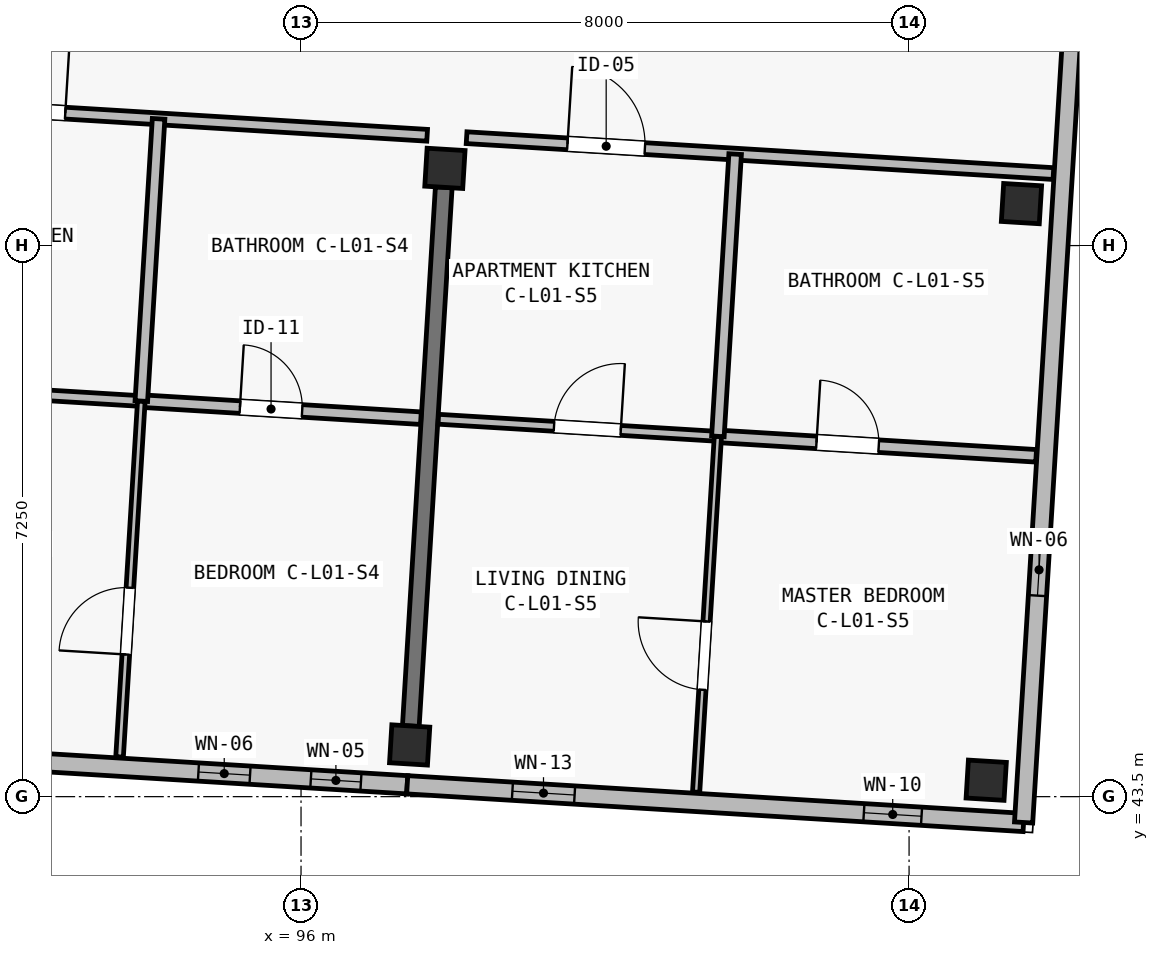
"""IFC4 building model, lengths in metres.
Left out: names, types, materials, properties, quantities, classifications, styles, units other than length and angle.
Written with IfcOpenShell. Run it as: python <this file> out.ifc"""

import sys

from ifc_helpers import new_model, si_unit, direction, frame, frame_2d, origin, origin_2d, place, context, subcontext, project, spatial, rectangle, extrude, element, fill, save


model = new_model("IFC4")
c1 = context("Model", 3, precision=1e-05, world=origin(), true_north=direction((0.0, 1.0)))
c2 = subcontext(c1, "Body", "Model", "MODEL_VIEW")
j1 = project(units=[si_unit("LENGTHUNIT", "METRE"), si_unit("PLANEANGLEUNIT", "RADIAN")], contexts=[c1])
p1 = place(None, origin())
s1 = spatial("IfcSite", under=j1, at=p1, CompositionType="ELEMENT")
p2 = place(p1, origin())
s2 = spatial("IfcBuilding", under=s1, at=p2, CompositionType="ELEMENT")
p3 = place(p2, frame((0.0, 0.0, 4.5)))
s3 = spatial("IfcBuildingStorey", under=s2, at=p3, CompositionType="ELEMENT", Elevation=4.5)
for number, where, z_axis, x_axis in (
    (1, (97.429, 44.18, 0.0), (0.0, 0.0, 1.0), (0.998, -0.061, 0.0)),
    (2, (97.893, 51.766, 0.0), (0.0, 0.0, 1.0), (0.998, -0.061, 0.0)),
    (3, (105.015, 43.716, 0.0), (0.0, 0.0, 1.0), (0.998, -0.061, 0.0)),
    (4, (105.479, 51.302, 0.0), (0.0, 0.0, 1.0), (0.998, -0.061, 0.0)),
):
    element("IfcColumn", number, at=place(p3, frame(where, z_axis=z_axis, x_axis=x_axis)), inside=s3, PredefinedType="COLUMN", context=c2, shape_type="SweptSolid", body=[
        extrude(rectangle(XDim=0.5, YDim=0.5, at=origin_2d()), origin(), (0.0, 0.0, 1.0), 3.9),
    ])
p4 = place(p3, frame((97.444, 44.43, -0.25), z_axis=(0.0, 0.0, 1.0), x_axis=(0.061070212127, 0.998133472633, 0.0)))
e5 = element("IfcWall", 5, at=p4, inside=s3, PredefinedType="SHEAR", context=c2, shape_type="SweptSolid", body=[
    extrude(rectangle(XDim=7.1, YDim=0.22, at=frame_2d((3.55, 0.0))), origin(), (0.0, 0.0, 1.0), 3.4),
])
p5 = place(p3, frame((97.397, 43.656, 0.0), z_axis=(0.0, 0.0, 1.0), x_axis=(-0.998135549572, 0.061036257095, 0.0)))
e6 = element("IfcWall", 6, at=p5, inside=s3, PredefinedType="SOLIDWALL", context=c2, shape_type="SweptSolid", body=[
    extrude(rectangle(XDim=7.6, YDim=0.24, at=frame_2d((3.8, 0.0))), origin(), (0.0, 0.0, 1.0), 3.65),
])
p6 = place(p5, frame((0.61, 0.0, 0.52)))
e7 = element("IfcOpeningElement", 7, at=p6, cuts=e6, PredefinedType="OPENING", context=c2, shape_type="SweptSolid", body=[
    extrude(rectangle(XDim=0.66, YDim=2.32, at=frame_2d((0.33, 1.16))), frame((0.0, 0.135, 0.0), z_axis=(0.0, -1.0, 0.0), x_axis=(1.0, 0.0, 0.0)), (0.0, 0.0, 1.0), 0.27),
])
p7 = place(p5, frame((2.072, 0.0, 0.42)))
e8 = element("IfcOpeningElement", 8, at=p7, cuts=e6, PredefinedType="OPENING", context=c2, shape_type="SweptSolid", body=[
    extrude(rectangle(XDim=0.68, YDim=2.24, at=frame_2d((0.34, 1.12))), frame((0.0, 0.135, 0.0), z_axis=(0.0, -1.0, 0.0), x_axis=(1.0, 0.0, 0.0)), (0.0, 0.0, 1.0), 0.27),
])
p8 = place(p5, frame((5.066, 0.0, 0.52)))
e9 = element("IfcOpeningElement", 9, at=p8, cuts=e6, PredefinedType="OPENING", context=c2, shape_type="SweptSolid", body=[
    extrude(rectangle(XDim=0.72, YDim=2.16, at=frame_2d((0.36, 1.08))), frame((0.0, 0.135, 0.0), z_axis=(0.0, -1.0, 0.0), x_axis=(1.0, 0.0, 0.0)), (0.0, 0.0, 1.0), 0.27),
])
p9 = place(p3, frame((105.507, 43.16, 0.0), z_axis=(0.0, 0.0, 1.0), x_axis=(-0.998134248939, 0.061057522844, 0.0)))
e10 = element("IfcWall", 10, at=p9, inside=s3, PredefinedType="SOLIDWALL", context=c2, shape_type="SweptSolid", body=[
    extrude(rectangle(XDim=8.125, YDim=0.24, at=frame_2d((4.062, 0.0))), origin(), (0.0, 0.0, 1.0), 3.65),
])
p10 = place(p9, frame((1.345, 0.0, 0.42)))
e11 = element("IfcOpeningElement", 11, at=p10, cuts=e10, PredefinedType="OPENING", context=c2, shape_type="SweptSolid", body=[
    extrude(rectangle(XDim=0.76, YDim=2.34, at=frame_2d((0.38, 1.17))), frame((0.0, 0.135, 0.0), z_axis=(0.0, -1.0, 0.0), x_axis=(1.0, 0.0, 0.0)), (0.0, 0.0, 1.0), 0.27),
])
p11 = place(p9, frame((5.919, 0.0, 0.42)))
e12 = element("IfcOpeningElement", 12, at=p11, cuts=e10, PredefinedType="OPENING", context=c2, shape_type="SweptSolid", body=[
    extrude(rectangle(XDim=0.82, YDim=2.18, at=frame_2d((0.41, 1.09))), frame((0.0, 0.135, 0.0), z_axis=(0.0, -1.0, 0.0), x_axis=(1.0, 0.0, 0.0)), (0.0, 0.0, 1.0), 0.27),
])
p12 = place(p3, frame((106.768, 63.771, 0.0), z_axis=(0.0, 0.0, 1.0), x_axis=(-0.061053332998, -0.99813450523, 0.0)))
e13 = element("IfcWall", 13, at=p12, inside=s3, PredefinedType="SOLIDWALL", context=c2, shape_type="SweptSolid", body=[
    extrude(rectangle(XDim=20.65, YDim=0.24, at=frame_2d((10.325, 0.0))), origin(), (0.0, 0.0, 1.0), 3.65),
])
p13 = place(p12, frame((2.63, 0.0, 0.52)))
e14 = element("IfcOpeningElement", 14, at=p13, cuts=e13, PredefinedType="OPENING", context=c2, shape_type="SweptSolid", body=[
    extrude(rectangle(XDim=0.84, YDim=2.28, at=frame_2d((0.42, 1.14))), frame((0.0, 0.135, 0.0), z_axis=(0.0, -1.0, 0.0), x_axis=(1.0, 0.0, 0.0)), (0.0, 0.0, 1.0), 0.27),
])
p14 = place(p12, frame((16.98, 0.0, 0.45)))
e15 = element("IfcOpeningElement", 15, at=p14, cuts=e13, PredefinedType="OPENING", context=c2, shape_type="SweptSolid", body=[
    extrude(rectangle(XDim=0.68, YDim=2.24, at=frame_2d((0.34, 1.12))), frame((0.0, 0.135, 0.0), z_axis=(0.0, -1.0, 0.0), x_axis=(1.0, 0.0, 0.0)), (0.0, 0.0, 1.0), 0.27),
])
p15 = place(p3, frame((90.593, 52.633, 0.0), z_axis=(0.0, 0.0, 1.0), x_axis=(0.998135538078, -0.061036445065, 0.0)))
e16 = element("IfcWall", 16, at=p15, inside=s3, PredefinedType="PARTITIONING", context=c2, shape_type="SweptSolid", body=[
    extrude(rectangle(XDim=7.08, YDim=0.155, at=frame_2d((3.54, 0.0))), origin(), (0.0, 0.0, 1.0), 3.62),
])
p16 = place(p15, frame((1.33, 0.0, 0.0)))
e17 = element("IfcOpeningElement", 17, at=p16, cuts=e16, PredefinedType="OPENING", context=c2, shape_type="SweptSolid", body=[
    extrude(rectangle(XDim=0.98, YDim=2.15, at=frame_2d((0.49, 1.075))), frame((0.0, 0.093, 0.0), z_axis=(0.0, -1.0, 0.0), x_axis=(1.0, 0.0, 0.0)), (0.0, 0.0, 1.0), 0.185),
])
p17 = place(p3, frame((90.221, 48.929, 0.0), z_axis=(0.0, 0.0, 1.0), x_axis=(0.99813243538, -0.061087162657, 0.0)))
e18 = element("IfcWall", 18, at=p17, inside=s3, PredefinedType="PARTITIONING", context=c2, shape_type="SweptSolid", body=[
    extrude(rectangle(XDim=3.685, YDim=0.14, at=frame_2d((1.842, 0.0))), origin(), (0.0, 0.0, 1.0), 3.62),
])
p18 = place(p17, frame((1.525, 0.0, 0.0)))
e19 = element("IfcOpeningElement", 19, at=p18, cuts=e18, PredefinedType="OPENING", context=c2, shape_type="SweptSolid", body=[
    extrude(rectangle(XDim=0.9, YDim=2.1, at=frame_2d((0.45, 1.05))), frame((0.0, 0.085, 0.0), z_axis=(0.0, -1.0, 0.0), x_axis=(1.0, 0.0, 0.0)), (0.0, 0.0, 1.0), 0.17),
])
p19 = place(p3, frame((93.899, 48.704, 0.0), z_axis=(0.0, 0.0, 1.0), x_axis=(0.998136719672, -0.061017119263, 0.0)))
e20 = element("IfcWall", 20, at=p19, inside=s3, PredefinedType="PLUMBINGWALL", context=c2, shape_type="SweptSolid", body=[
    extrude(rectangle(XDim=3.685, YDim=0.165, at=frame_2d((1.843, 0.0))), origin(), (0.0, 0.0, 1.0), 3.62),
])
p20 = place(p19, frame((1.3, 0.0, 0.0)))
e21 = element("IfcOpeningElement", 21, at=p20, cuts=e20, PredefinedType="OPENING", context=c2, shape_type="SweptSolid", body=[
    extrude(rectangle(XDim=0.82, YDim=2.08, at=frame_2d((0.41, 1.04))), frame((0.0, 0.097, 0.0), z_axis=(0.0, -1.0, 0.0), x_axis=(1.0, 0.0, 0.0)), (0.0, 0.0, 1.0), 0.195),
])
p21 = place(p3, frame((93.612, 44.023, 0.0), z_axis=(0.0, 0.0, 1.0), x_axis=(0.061062434628, 0.998133948465, 0.0)))
e22 = element("IfcWall", 22, at=p21, inside=s3, PredefinedType="PARTITIONING", context=c2, shape_type="SweptSolid", body=[
    extrude(rectangle(XDim=4.69, YDim=0.1, at=frame_2d((2.345, 0.0))), origin(), (0.0, 0.0, 1.0), 3.62),
])
p22 = place(p21, frame((1.35, 0.0, 0.0)))
e23 = element("IfcOpeningElement", 23, at=p22, cuts=e22, PredefinedType="OPENING", context=c2, shape_type="SweptSolid", body=[
    extrude(rectangle(XDim=0.88, YDim=2.1, at=frame_2d((0.44, 1.05))), frame((0.0, 0.065, 0.0), z_axis=(0.0, -1.0, 0.0), x_axis=(1.0, 0.0, 0.0)), (0.0, 0.0, 1.0), 0.13),
])
p23 = place(p3, frame((93.899, 48.704, 0.0), z_axis=(0.0, 0.0, 1.0), x_axis=(0.061034005467, 0.998135687257, 0.0)))
e24 = element("IfcWall", 24, at=p23, inside=s3, PredefinedType="PLUMBINGWALL", context=c2, shape_type="SweptSolid", body=[
    extrude(rectangle(XDim=3.72, YDim=0.165, at=frame_2d((1.86, 0.0))), origin(), (0.0, 0.0, 1.0), 3.62),
])
p24 = place(p3, frame((98.178, 52.169, 0.0), z_axis=(0.0, 0.0, 1.0), x_axis=(0.998133272394, -0.061073484761, 0.0)))
e25 = element("IfcWall", 25, at=p24, inside=s3, PredefinedType="PARTITIONING", context=c2, shape_type="SweptSolid", body=[
    extrude(rectangle(XDim=7.735, YDim=0.155, at=frame_2d((3.868, 0.0))), origin(), (0.0, 0.0, 1.0), 3.62),
])
p25 = place(p24, frame((1.33, 0.0, 0.0)))
e26 = element("IfcOpeningElement", 26, at=p25, cuts=e25, PredefinedType="OPENING", context=c2, shape_type="SweptSolid", body=[
    extrude(rectangle(XDim=1.02, YDim=2.2, at=frame_2d((0.51, 1.1))), frame((0.0, 0.093, 0.0), z_axis=(0.0, -1.0, 0.0), x_axis=(1.0, 0.0, 0.0)), (0.0, 0.0, 1.0), 0.185),
])
p26 = place(p3, frame((97.806, 48.465, 0.0), z_axis=(0.0, 0.0, 1.0), x_axis=(0.998136719672, -0.061017119263, 0.0)))
e27 = element("IfcWall", 27, at=p26, inside=s3, PredefinedType="PARTITIONING", context=c2, shape_type="SweptSolid", body=[
    extrude(rectangle(XDim=3.685, YDim=0.13, at=frame_2d((1.843, 0.0))), origin(), (0.0, 0.0, 1.0), 3.62),
])
p27 = place(p26, frame((1.525, 0.0, 0.0)))
e28 = element("IfcOpeningElement", 28, at=p27, cuts=e27, PredefinedType="OPENING", context=c2, shape_type="SweptSolid", body=[
    extrude(rectangle(XDim=0.88, YDim=2.1, at=frame_2d((0.44, 1.05))), frame((0.0, 0.08, 0.0), z_axis=(0.0, -1.0, 0.0), x_axis=(1.0, 0.0, 0.0)), (0.0, 0.0, 1.0), 0.16),
])
p28 = place(p3, frame((101.485, 48.24, 0.0), z_axis=(0.0, 0.0, 1.0), x_axis=(0.998134581856, -0.061052080255, 0.0)))
e29 = element("IfcWall", 29, at=p28, inside=s3, PredefinedType="PLUMBINGWALL", context=c2, shape_type="SweptSolid", body=[
    extrude(rectangle(XDim=4.195, YDim=0.165, at=frame_2d((2.097, 0.0))), origin(), (0.0, 0.0, 1.0), 3.62),
])
p29 = place(p28, frame((1.3, 0.0, 0.0)))
e30 = element("IfcOpeningElement", 30, at=p29, cuts=e29, PredefinedType="OPENING", context=c2, shape_type="SweptSolid", body=[
    extrude(rectangle(XDim=0.82, YDim=2.08, at=frame_2d((0.41, 1.04))), frame((0.0, 0.097, 0.0), z_axis=(0.0, -1.0, 0.0), x_axis=(1.0, 0.0, 0.0)), (0.0, 0.0, 1.0), 0.195),
])
p30 = place(p3, frame((101.198, 43.559, 0.0), z_axis=(0.0, 0.0, 1.0), x_axis=(0.061059262019, 0.998134142549, 0.0)))
e31 = element("IfcWall", 31, at=p30, inside=s3, PredefinedType="PARTITIONING", context=c2, shape_type="SweptSolid", body=[
    extrude(rectangle(XDim=4.69, YDim=0.095, at=frame_2d((2.345, 0.0))), origin(), (0.0, 0.0, 1.0), 3.62),
])
p31 = place(p30, frame((1.35, 0.0, 0.0)))
e32 = element("IfcOpeningElement", 32, at=p31, cuts=e31, PredefinedType="OPENING", context=c2, shape_type="SweptSolid", body=[
    extrude(rectangle(XDim=0.9, YDim=2.1, at=frame_2d((0.45, 1.05))), frame((0.0, 0.062, 0.0), z_axis=(0.0, -1.0, 0.0), x_axis=(1.0, 0.0, 0.0)), (0.0, 0.0, 1.0), 0.125),
])
p32 = place(p3, frame((101.485, 48.24, 0.0), z_axis=(0.0, 0.0, 1.0), x_axis=(0.061038003798, 0.998135442759, 0.0)))
e33 = element("IfcWall", 33, at=p32, inside=s3, PredefinedType="PLUMBINGWALL", context=c2, shape_type="SweptSolid", body=[
    extrude(rectangle(XDim=3.72, YDim=0.165, at=frame_2d((1.86, 0.0))), origin(), (0.0, 0.0, 1.0), 3.62),
])
p33 = place(p6, origin())
e34 = element("IfcWindow", 34, at=p33, inside=s3, PartitioningType="SINGLE_PANEL", PredefinedType="WINDOW", context=c2, shape_type="SweptSolid", body=[
    extrude(rectangle(XDim=0.66, YDim=2.32, at=frame_2d((0.33, 1.16))), frame((0.0, 0.03, 0.0), z_axis=(0.0, -1.0, 0.0), x_axis=(1.0, 0.0, 0.0)), (0.0, 0.0, 1.0), 0.06),
])
fill(e7, e34)
p34 = place(p7, origin())
e35 = element("IfcWindow", 35, at=p34, inside=s3, PartitioningType="SINGLE_PANEL", PredefinedType="WINDOW", context=c2, shape_type="SweptSolid", body=[
    extrude(rectangle(XDim=0.68, YDim=2.24, at=frame_2d((0.34, 1.12))), frame((0.0, 0.03, 0.0), z_axis=(0.0, -1.0, 0.0), x_axis=(1.0, 0.0, 0.0)), (0.0, 0.0, 1.0), 0.06),
])
fill(e8, e35)
p35 = place(p10, origin())
e36 = element("IfcWindow", 36, at=p35, inside=s3, PartitioningType="SINGLE_PANEL", PredefinedType="WINDOW", context=c2, shape_type="SweptSolid", body=[
    extrude(rectangle(XDim=0.76, YDim=2.34, at=frame_2d((0.38, 1.17))), frame((0.0, 0.03, 0.0), z_axis=(0.0, -1.0, 0.0), x_axis=(1.0, 0.0, 0.0)), (0.0, 0.0, 1.0), 0.06),
])
fill(e11, e36)
p36 = place(p11, origin())
e37 = element("IfcWindow", 37, at=p36, inside=s3, PartitioningType="SINGLE_PANEL", PredefinedType="WINDOW", context=c2, shape_type="SweptSolid", body=[
    extrude(rectangle(XDim=0.82, YDim=2.18, at=frame_2d((0.41, 1.09))), frame((0.0, 0.03, 0.0), z_axis=(0.0, -1.0, 0.0), x_axis=(1.0, 0.0, 0.0)), (0.0, 0.0, 1.0), 0.06),
])
fill(e12, e37)
p37 = place(p14, origin())
e38 = element("IfcWindow", 38, at=p37, inside=s3, PartitioningType="SINGLE_PANEL", PredefinedType="WINDOW", context=c2, shape_type="SweptSolid", body=[
    extrude(rectangle(XDim=0.68, YDim=2.24, at=frame_2d((0.34, 1.12))), frame((0.0, 0.03, 0.0), z_axis=(0.0, -1.0, 0.0), x_axis=(1.0, 0.0, 0.0)), (0.0, 0.0, 1.0), 0.06),
])
fill(e15, e38)
p38 = place(p16, origin())
e39 = element("IfcDoor", 39, at=p38, inside=s3, OperationType="SINGLE_SWING_RIGHT", PredefinedType="DOOR", context=c2, shape_type="SweptSolid", body=[
    extrude(rectangle(XDim=0.98, YDim=2.15, at=frame_2d((0.49, 1.075))), frame((0.0, 0.025, 0.0), z_axis=(0.0, -1.0, 0.0), x_axis=(1.0, 0.0, 0.0)), (0.0, 0.0, 1.0), 0.05),
])
fill(e17, e39)
p39 = place(p20, origin())
e40 = element("IfcDoor", 40, at=p39, inside=s3, OperationType="SINGLE_SWING_LEFT", PredefinedType="DOOR", context=c2, shape_type="SweptSolid", body=[
    extrude(rectangle(XDim=0.82, YDim=2.08, at=frame_2d((0.41, 1.04))), frame((0.0, 0.025, 0.0), z_axis=(0.0, -1.0, 0.0), x_axis=(1.0, 0.0, 0.0)), (0.0, 0.0, 1.0), 0.05),
])
fill(e21, e40)
p40 = place(p22, origin())
e41 = element("IfcDoor", 41, at=p40, inside=s3, OperationType="SINGLE_SWING_LEFT", PredefinedType="DOOR", context=c2, shape_type="SweptSolid", body=[
    extrude(rectangle(XDim=0.88, YDim=2.1, at=frame_2d((0.44, 1.05))), frame((0.0, 0.025, 0.0), z_axis=(0.0, -1.0, 0.0), x_axis=(1.0, 0.0, 0.0)), (0.0, 0.0, 1.0), 0.05),
])
fill(e23, e41)
p41 = place(p25, origin())
e42 = element("IfcDoor", 42, at=p41, inside=s3, OperationType="SINGLE_SWING_LEFT", PredefinedType="DOOR", context=c2, shape_type="SweptSolid", body=[
    extrude(rectangle(XDim=1.02, YDim=2.2, at=frame_2d((0.51, 1.1))), frame((0.0, 0.025, 0.0), z_axis=(0.0, -1.0, 0.0), x_axis=(1.0, 0.0, 0.0)), (0.0, 0.0, 1.0), 0.05),
])
fill(e26, e42)
p42 = place(p27, origin())
e43 = element("IfcDoor", 43, at=p42, inside=s3, OperationType="SINGLE_SWING_RIGHT", PredefinedType="DOOR", context=c2, shape_type="SweptSolid", body=[
    extrude(rectangle(XDim=0.88, YDim=2.1, at=frame_2d((0.44, 1.05))), frame((0.0, 0.025, 0.0), z_axis=(0.0, -1.0, 0.0), x_axis=(1.0, 0.0, 0.0)), (0.0, 0.0, 1.0), 0.05),
])
fill(e28, e43)
p43 = place(p29, origin())
e44 = element("IfcDoor", 44, at=p43, inside=s3, OperationType="SINGLE_SWING_LEFT", PredefinedType="DOOR", context=c2, shape_type="SweptSolid", body=[
    extrude(rectangle(XDim=0.82, YDim=2.08, at=frame_2d((0.41, 1.04))), frame((0.0, 0.025, 0.0), z_axis=(0.0, -1.0, 0.0), x_axis=(1.0, 0.0, 0.0)), (0.0, 0.0, 1.0), 0.05),
])
fill(e30, e44)
p44 = place(p31, origin())
e45 = element("IfcDoor", 45, at=p44, inside=s3, OperationType="SINGLE_SWING_RIGHT", PredefinedType="DOOR", context=c2, shape_type="SweptSolid", body=[
    extrude(rectangle(XDim=0.9, YDim=2.1, at=frame_2d((0.45, 1.05))), frame((0.0, 0.025, 0.0), z_axis=(0.0, -1.0, 0.0), x_axis=(1.0, 0.0, 0.0)), (0.0, 0.0, 1.0), 0.05),
])
fill(e32, e45)
save(model, sys.argv[1])
